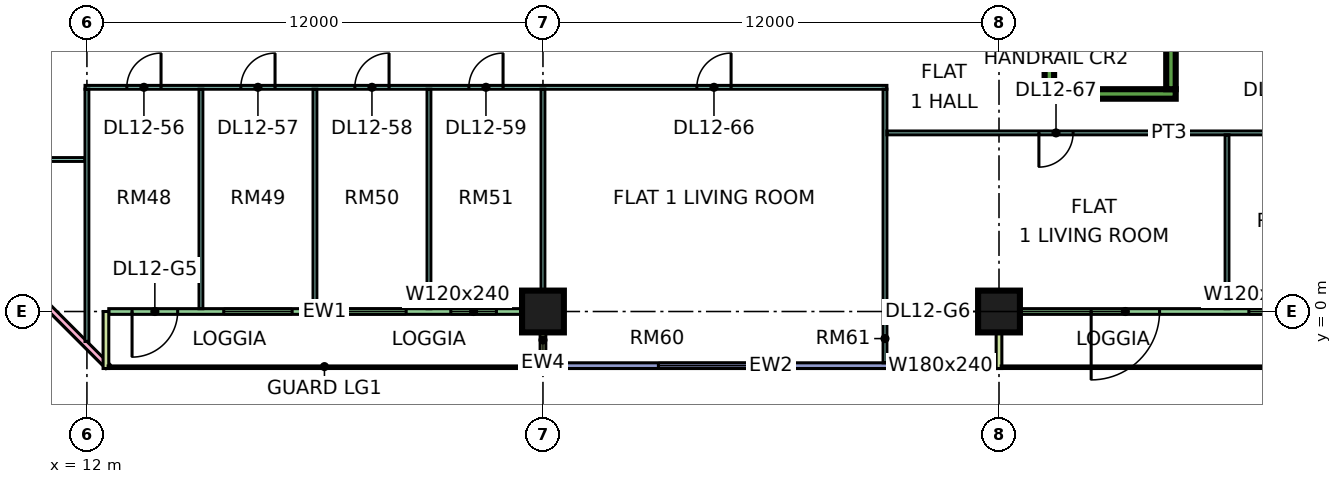
"""IFC4 building model, lengths in metres.
Left out: names, types, materials, properties, quantities, classifications, styles, units other than length and angle.
Written with IfcOpenShell. Run it as: python <this file> out.ifc"""

import sys

from ifc_helpers import new_model, si_unit, direction, frame, frame_2d, origin, origin_2d, place, context, subcontext, project, spatial, rectangle, extrude, element, fill, save


model = new_model("IFC4")
c1 = context("Model", 3, precision=1e-05, world=origin(), true_north=direction((0.0, 1.0)))
c2 = subcontext(c1, "Body", "Model", "MODEL_VIEW")
j1 = project(units=[si_unit("LENGTHUNIT", "METRE"), si_unit("PLANEANGLEUNIT", "RADIAN")], contexts=[c1])
p1 = place(None, origin())
s1 = spatial("IfcSite", under=j1, at=p1, CompositionType="ELEMENT")
p2 = place(p1, origin())
s2 = spatial("IfcBuilding", under=s1, at=p2, CompositionType="ELEMENT")
p3 = place(p2, frame((0.0, 0.0, 60.15)))
s3 = spatial("IfcBuildingStorey", under=s2, at=p3, CompositionType="ELEMENT", Elevation=60.15)
for number, where, z_axis, x_axis in (
    (1, (24.0, 0.0, 0.0), (0.0, 0.0, 1.0), (1.0, 0.0, 0.0)),
    (2, (36.0, 0.0, 0.0), (0.0, 0.0, 1.0), (1.0, 0.0, 0.0)),
):
    element("IfcColumn", number, at=place(p3, frame(where, z_axis=z_axis, x_axis=x_axis)), inside=s3, PredefinedType="COLUMN", context=c2, shape_type="SweptSolid", body=[
        extrude(rectangle(XDim=1.1, YDim=1.1, at=origin_2d()), origin(), (0.0, 0.0, 1.0), 3.75),
    ])
p4 = place(p3, frame((37.2, 5.725, 0.0), z_axis=(0.0, 0.0, 1.0), x_axis=(1.0, 0.0, 0.0)))
e3 = element("IfcWall", 3, at=p4, inside=s3, PredefinedType="SHEAR", context=c2, shape_type="SweptSolid", body=[
    extrude(rectangle(XDim=3.45, YDim=0.25, at=frame_2d((1.725, 0.0))), origin(), (0.0, 0.0, 1.0), 3.75),
])
for number, where, z_axis, x_axis in (
    (4, (37.325, 5.85, 0.0), (0.0, 0.0, 1.0), (0.0, 1.0, 0.0)),
    (5, (40.525, 5.85, 0.0), (0.0, 0.0, 1.0), (0.0, 1.0, 0.0)),
):
    element("IfcWall", number, at=place(p3, frame(where, z_axis=z_axis, x_axis=x_axis)), inside=s3, PredefinedType="SHEAR", context=c2, shape_type="SweptSolid", body=[
        extrude(rectangle(XDim=6.5, YDim=0.25, at=frame_2d((3.25, 0.0))), origin(), (0.0, 0.0, 1.0), 3.75),
    ])
p5 = place(p3, frame((-1.447, 12.553, 0.0), z_axis=(0.0, 0.0, 1.0), x_axis=(0.707106781187, -0.707106781187, 0.0)))
e6 = element("IfcWall", 6, at=p5, inside=s3, PredefinedType="SOLIDWALL", context=c2, shape_type="SweptSolid", body=[
    extrude(rectangle(XDim=19.799, YDim=0.15, at=frame_2d((9.899, 0.0))), origin(), (0.0, 0.0, 1.0), 3.35),
])
p6 = place(p5, frame((2.212, 0.0, 0.45)))
e7 = element("IfcOpeningElement", 7, at=p6, cuts=e6, PredefinedType="OPENING", context=c2, shape_type="SweptSolid", body=[
    extrude(rectangle(XDim=3.0, YDim=2.4, at=frame_2d((1.5, 1.2))), frame((0.0, 0.085, 0.0), z_axis=(0.0, -1.0, 0.0), x_axis=(1.0, 0.0, 0.0)), (0.0, 0.0, 1.0), 0.17),
])
p7 = place(p5, frame((10.216, 0.0, 0.45)))
e8 = element("IfcOpeningElement", 8, at=p7, cuts=e6, PredefinedType="OPENING", context=c2, shape_type="SweptSolid", body=[
    extrude(rectangle(XDim=3.0, YDim=2.4, at=frame_2d((1.5, 1.2))), frame((0.0, 0.085, 0.0), z_axis=(0.0, -1.0, 0.0), x_axis=(1.0, 0.0, 0.0)), (0.0, 0.0, 1.0), 0.17),
])
p8 = place(p3, frame((12.575, 0.0, 0.0), z_axis=(0.0, 0.0, 1.0), x_axis=(1.0, 0.0, 0.0)))
e9 = element("IfcWall", 9, at=p8, inside=s3, PredefinedType="SOLIDWALL", context=c2, shape_type="SweptSolid", body=[
    extrude(rectangle(XDim=11.35, YDim=0.15, at=frame_2d((5.675, 0.0))), origin(), (0.0, 0.0, 1.0), 3.35),
])
p9 = place(p8, frame((0.613, 0.0, 0.0)))
e10 = element("IfcOpeningElement", 10, at=p9, cuts=e9, PredefinedType="OPENING", context=c2, shape_type="SweptSolid", body=[
    extrude(rectangle(XDim=1.2, YDim=2.4, at=frame_2d((0.6, 1.2))), frame((0.0, 0.085, 0.0), z_axis=(0.0, -1.0, 0.0), x_axis=(1.0, 0.0, 0.0)), (0.0, 0.0, 1.0), 0.17),
])
p10 = place(p8, frame((3.025, 0.0, 0.45)))
e11 = element("IfcOpeningElement", 11, at=p10, cuts=e9, PredefinedType="OPENING", context=c2, shape_type="SweptSolid", body=[
    extrude(rectangle(XDim=1.8, YDim=2.4, at=frame_2d((0.9, 1.2))), frame((0.0, 0.085, 0.0), z_axis=(0.0, -1.0, 0.0), x_axis=(1.0, 0.0, 0.0)), (0.0, 0.0, 1.0), 0.17),
])
p11 = place(p8, frame((6.025, 0.0, 0.45)))
e12 = element("IfcOpeningElement", 12, at=p11, cuts=e9, PredefinedType="OPENING", context=c2, shape_type="SweptSolid", body=[
    extrude(rectangle(XDim=1.8, YDim=2.4, at=frame_2d((0.9, 1.2))), frame((0.0, 0.085, 0.0), z_axis=(0.0, -1.0, 0.0), x_axis=(1.0, 0.0, 0.0)), (0.0, 0.0, 1.0), 0.17),
])
p12 = place(p8, frame((9.0, 0.0, 0.45)))
e13 = element("IfcOpeningElement", 13, at=p12, cuts=e9, PredefinedType="OPENING", context=c2, shape_type="SweptSolid", body=[
    extrude(rectangle(XDim=1.2, YDim=2.4, at=frame_2d((0.6, 1.2))), frame((0.0, 0.085, 0.0), z_axis=(0.0, -1.0, 0.0), x_axis=(1.0, 0.0, 0.0)), (0.0, 0.0, 1.0), 0.17),
])
for number, where, z_axis, x_axis in (
    (14, (12.5, -1.5, 0.0), (0.0, 0.0, 1.0), (0.0, 1.0, 0.0)),
    (15, (24.0, -1.5, 0.0), (0.0, 0.0, 1.0), (0.0, 1.0, 0.0)),
):
    element("IfcWall", number, at=place(p3, frame(where, z_axis=z_axis, x_axis=x_axis)), inside=s3, PredefinedType="SOLIDWALL", context=c2, shape_type="SweptSolid", body=[
        extrude(rectangle(XDim=1.5, YDim=0.15, at=frame_2d((0.75, 0.0))), origin(), (0.0, 0.0, 1.0), 3.35),
    ])
p13 = place(p3, frame((24.075, -1.425, 0.0), z_axis=(0.0, 0.0, 1.0), x_axis=(1.0, 0.0, 0.0)))
e16 = element("IfcWall", 16, at=p13, inside=s3, PredefinedType="SOLIDWALL", context=c2, shape_type="SweptSolid", body=[
    extrude(rectangle(XDim=11.85, YDim=0.15, at=frame_2d((5.925, 0.0))), origin(), (0.0, 0.0, 1.0), 3.35),
])
p14 = place(p13, frame((2.962, 0.0, 0.45)))
e17 = element("IfcOpeningElement", 17, at=p14, cuts=e16, PredefinedType="OPENING", context=c2, shape_type="SweptSolid", body=[
    extrude(rectangle(XDim=3.0, YDim=2.4, at=frame_2d((1.5, 1.2))), frame((0.0, 0.085, 0.0), z_axis=(0.0, -1.0, 0.0), x_axis=(1.0, 0.0, 0.0)), (0.0, 0.0, 1.0), 0.17),
])
p15 = place(p13, frame((9.488, 0.0, 0.45)))
e18 = element("IfcOpeningElement", 18, at=p15, cuts=e16, PredefinedType="OPENING", context=c2, shape_type="SweptSolid", body=[
    extrude(rectangle(XDim=1.8, YDim=2.4, at=frame_2d((0.9, 1.2))), frame((0.0, 0.085, 0.0), z_axis=(0.0, -1.0, 0.0), x_axis=(1.0, 0.0, 0.0)), (0.0, 0.0, 1.0), 0.17),
])
p16 = place(p3, frame((36.075, 0.0, 0.0), z_axis=(0.0, 0.0, 1.0), x_axis=(1.0, 0.0, 0.0)))
e19 = element("IfcWall", 19, at=p16, inside=s3, PredefinedType="SOLIDWALL", context=c2, shape_type="SweptSolid", body=[
    extrude(rectangle(XDim=11.85, YDim=0.15, at=frame_2d((5.925, 0.0))), origin(), (0.0, 0.0, 1.0), 3.35),
])
p17 = place(p16, frame((2.35, 0.0, 0.0)))
e20 = element("IfcOpeningElement", 20, at=p17, cuts=e19, PredefinedType="OPENING", context=c2, shape_type="SweptSolid", body=[
    extrude(rectangle(XDim=1.8, YDim=2.4, at=frame_2d((0.9, 1.2))), frame((0.0, 0.085, 0.0), z_axis=(0.0, -1.0, 0.0), x_axis=(1.0, 0.0, 0.0)), (0.0, 0.0, 1.0), 0.17),
])
p18 = place(p16, frame((6.5, 0.0, 0.45)))
e21 = element("IfcOpeningElement", 21, at=p18, cuts=e19, PredefinedType="OPENING", context=c2, shape_type="SweptSolid", body=[
    extrude(rectangle(XDim=1.2, YDim=2.4, at=frame_2d((0.6, 1.2))), frame((0.0, 0.085, 0.0), z_axis=(0.0, -1.0, 0.0), x_axis=(1.0, 0.0, 0.0)), (0.0, 0.0, 1.0), 0.17),
])
p19 = place(p16, frame((10.113, 0.0, 0.45)))
e22 = element("IfcOpeningElement", 22, at=p19, cuts=e19, PredefinedType="OPENING", context=c2, shape_type="SweptSolid", body=[
    extrude(rectangle(XDim=1.2, YDim=2.4, at=frame_2d((0.6, 1.2))), frame((0.0, 0.085, 0.0), z_axis=(0.0, -1.0, 0.0), x_axis=(1.0, 0.0, 0.0)), (0.0, 0.0, 1.0), 0.17),
])
p20 = place(p3, frame((36.0, -1.5, 0.0), z_axis=(0.0, 0.0, 1.0), x_axis=(0.0, 1.0, 0.0)))
e23 = element("IfcWall", 23, at=p20, inside=s3, PredefinedType="SOLIDWALL", context=c2, shape_type="SweptSolid", body=[
    extrude(rectangle(XDim=1.5, YDim=0.15, at=frame_2d((0.75, 0.0))), origin(), (0.0, 0.0, 1.0), 3.35),
])
p21 = place(p3, frame((9.05, 4.0, 0.0), z_axis=(0.0, 0.0, 1.0), x_axis=(1.0, 0.0, 0.0)))
e24 = element("IfcWall", 24, at=p21, inside=s3, PredefinedType="PARTITIONING", context=c2, shape_type="SweptSolid", body=[
    extrude(rectangle(XDim=2.9, YDim=0.1, at=frame_2d((1.45, 0.0))), origin(), (0.0, 0.0, 1.0), 3.35),
])
p22 = place(p3, frame((11.95, 5.9, 0.0), z_axis=(0.0, 0.0, 1.0), x_axis=(1.0, 0.0, 0.0)))
e25 = element("IfcWall", 25, at=p22, inside=s3, PredefinedType="PARTITIONING", context=c2, shape_type="SweptSolid", body=[
    extrude(rectangle(XDim=21.1, YDim=0.1, at=frame_2d((10.55, 0.0))), origin(), (0.0, 0.0, 1.0), 3.35),
])
p23 = place(p22, frame((1.1, 0.0, 0.0)))
e26 = element("IfcOpeningElement", 26, at=p23, cuts=e25, PredefinedType="OPENING", context=c2, shape_type="SweptSolid", body=[
    extrude(rectangle(XDim=0.9, YDim=2.1, at=frame_2d((0.45, 1.05))), frame((0.0, 0.06, 0.0), z_axis=(0.0, -1.0, 0.0), x_axis=(1.0, 0.0, 0.0)), (0.0, 0.0, 1.0), 0.12),
])
p24 = place(p22, frame((4.1, 0.0, 0.0)))
e27 = element("IfcOpeningElement", 27, at=p24, cuts=e25, PredefinedType="OPENING", context=c2, shape_type="SweptSolid", body=[
    extrude(rectangle(XDim=0.9, YDim=2.1, at=frame_2d((0.45, 1.05))), frame((0.0, 0.06, 0.0), z_axis=(0.0, -1.0, 0.0), x_axis=(1.0, 0.0, 0.0)), (0.0, 0.0, 1.0), 0.12),
])
p25 = place(p22, frame((7.1, 0.0, 0.0)))
e28 = element("IfcOpeningElement", 28, at=p25, cuts=e25, PredefinedType="OPENING", context=c2, shape_type="SweptSolid", body=[
    extrude(rectangle(XDim=0.9, YDim=2.1, at=frame_2d((0.45, 1.05))), frame((0.0, 0.06, 0.0), z_axis=(0.0, -1.0, 0.0), x_axis=(1.0, 0.0, 0.0)), (0.0, 0.0, 1.0), 0.12),
])
p26 = place(p22, frame((10.1, 0.0, 0.0)))
e29 = element("IfcOpeningElement", 29, at=p26, cuts=e25, PredefinedType="OPENING", context=c2, shape_type="SweptSolid", body=[
    extrude(rectangle(XDim=0.9, YDim=2.1, at=frame_2d((0.45, 1.05))), frame((0.0, 0.06, 0.0), z_axis=(0.0, -1.0, 0.0), x_axis=(1.0, 0.0, 0.0)), (0.0, 0.0, 1.0), 0.12),
])
p27 = place(p22, frame((16.1, 0.0, 0.0)))
e30 = element("IfcOpeningElement", 30, at=p27, cuts=e25, PredefinedType="OPENING", context=c2, shape_type="SweptSolid", body=[
    extrude(rectangle(XDim=0.9, YDim=2.1, at=frame_2d((0.45, 1.05))), frame((0.0, 0.06, 0.0), z_axis=(0.0, -1.0, 0.0), x_axis=(1.0, 0.0, 0.0)), (0.0, 0.0, 1.0), 0.12),
])
p28 = place(p3, frame((12.0, -0.788, 0.0), z_axis=(0.0, 0.0, 1.0), x_axis=(0.0, 1.0, 0.0)))
e31 = element("IfcWall", 31, at=p28, inside=s3, PredefinedType="PARTITIONING", context=c2, shape_type="SweptSolid", body=[
    extrude(rectangle(XDim=6.638, YDim=0.1, at=frame_2d((3.319, 0.0))), origin(), (0.0, 0.0, 1.0), 3.35),
])
for number, where, z_axis, x_axis in (
    (32, (15.0, 0.074, 0.0), (0.0, 0.0, 1.0), (0.0, 1.0, 0.0)),
    (33, (18.0, 0.074, 0.0), (0.0, 0.0, 1.0), (0.0, 1.0, 0.0)),
    (34, (21.0, 0.074, 0.0), (0.0, 0.0, 1.0), (0.0, 1.0, 0.0)),
):
    element("IfcWall", number, at=place(p3, frame(where, z_axis=z_axis, x_axis=x_axis)), inside=s3, PredefinedType="PARTITIONING", context=c2, shape_type="SweptSolid", body=[
        extrude(rectangle(XDim=5.776, YDim=0.1, at=frame_2d((2.888, 0.0))), origin(), (0.0, 0.0, 1.0), 3.35),
    ])
p29 = place(p3, frame((24.0, 0.0, 0.0), z_axis=(0.0, 0.0, 1.0), x_axis=(0.0, 1.0, 0.0)))
e35 = element("IfcWall", 35, at=p29, inside=s3, PredefinedType="PARTITIONING", context=c2, shape_type="SweptSolid", body=[
    extrude(rectangle(XDim=5.85, YDim=0.1, at=frame_2d((2.925, 0.0))), origin(), (0.0, 0.0, 1.0), 3.35),
])
p30 = place(p3, frame((33.0, -1.35, 0.0), z_axis=(0.0, 0.0, 1.0), x_axis=(0.0, 1.0, 0.0)))
e36 = element("IfcWall", 36, at=p30, inside=s3, PredefinedType="PARTITIONING", context=c2, shape_type="SweptSolid", body=[
    extrude(rectangle(XDim=7.2, YDim=0.1, at=frame_2d((3.6, 0.0))), origin(), (0.0, 0.0, 1.0), 3.35),
])
p31 = place(p3, frame((33.05, 4.7, 0.0), z_axis=(0.0, 0.0, 1.0), x_axis=(1.0, 0.0, 0.0)))
e37 = element("IfcWall", 37, at=p31, inside=s3, PredefinedType="PARTITIONING", context=c2, shape_type="SweptSolid", body=[
    extrude(rectangle(XDim=14.85, YDim=0.1, at=frame_2d((7.425, 0.0))), origin(), (0.0, 0.0, 1.0), 3.35),
])
p32 = place(p31, frame((10.0, 0.0, 0.0)))
e38 = element("IfcOpeningElement", 38, at=p32, cuts=e37, PredefinedType="OPENING", context=c2, shape_type="SweptSolid", body=[
    extrude(rectangle(XDim=0.9, YDim=2.1, at=frame_2d((0.45, 1.05))), frame((0.0, 0.06, 0.0), z_axis=(0.0, -1.0, 0.0), x_axis=(1.0, 0.0, 0.0)), (0.0, 0.0, 1.0), 0.12),
])
p33 = place(p31, frame((13.0, 0.0, 0.0)))
e39 = element("IfcOpeningElement", 39, at=p33, cuts=e37, PredefinedType="OPENING", context=c2, shape_type="SweptSolid", body=[
    extrude(rectangle(XDim=0.9, YDim=2.1, at=frame_2d((0.45, 1.05))), frame((0.0, 0.06, 0.0), z_axis=(0.0, -1.0, 0.0), x_axis=(1.0, 0.0, 0.0)), (0.0, 0.0, 1.0), 0.12),
])
p34 = place(p31, frame((4.0, 0.0, 0.0)))
e40 = element("IfcOpeningElement", 40, at=p34, cuts=e37, PredefinedType="OPENING", context=c2, shape_type="SweptSolid", body=[
    extrude(rectangle(XDim=0.9, YDim=2.1, at=frame_2d((0.45, 1.05))), frame((0.0, 0.06, 0.0), z_axis=(0.0, -1.0, 0.0), x_axis=(1.0, 0.0, 0.0)), (0.0, 0.0, 1.0), 0.12),
])
p35 = place(p3, frame((42.0, 0.074, 0.0), z_axis=(0.0, 0.0, 1.0), x_axis=(0.0, 1.0, 0.0)))
e41 = element("IfcWall", 41, at=p35, inside=s3, PredefinedType="PARTITIONING", context=c2, shape_type="SweptSolid", body=[
    extrude(rectangle(XDim=4.576, YDim=0.1, at=frame_2d((2.288, 0.0))), origin(), (0.0, 0.0, 1.0), 3.35),
])
p36 = place(p9, frame((1.2, 0.0, 0.0), z_axis=(0.0, 0.0, 1.0), x_axis=(-1.0, 0.0, 0.0)))
e42 = element("IfcDoor", 42, at=p36, inside=s3, OperationType="DOUBLE_DOOR_SINGLE_SWING", PredefinedType="DOOR", context=c2, shape_type="SweptSolid", body=[
    extrude(rectangle(XDim=1.2, YDim=2.4, at=frame_2d((0.6, 1.2))), frame((0.0, 0.025, 0.0), z_axis=(0.0, -1.0, 0.0), x_axis=(1.0, 0.0, 0.0)), (0.0, 0.0, 1.0), 0.05),
])
fill(e10, e42)
p37 = place(p10, origin())
e43 = element("IfcWindow", 43, at=p37, inside=s3, PartitioningType="SINGLE_PANEL", PredefinedType="WINDOW", context=c2, shape_type="SweptSolid", body=[
    extrude(rectangle(XDim=1.8, YDim=2.4, at=frame_2d((0.9, 1.2))), frame((0.0, 0.03, 0.0), z_axis=(0.0, -1.0, 0.0), x_axis=(1.0, 0.0, 0.0)), (0.0, 0.0, 1.0), 0.06),
])
fill(e11, e43)
p38 = place(p11, origin())
e44 = element("IfcWindow", 44, at=p38, inside=s3, PartitioningType="SINGLE_PANEL", PredefinedType="WINDOW", context=c2, shape_type="SweptSolid", body=[
    extrude(rectangle(XDim=1.8, YDim=2.4, at=frame_2d((0.9, 1.2))), frame((0.0, 0.03, 0.0), z_axis=(0.0, -1.0, 0.0), x_axis=(1.0, 0.0, 0.0)), (0.0, 0.0, 1.0), 0.06),
])
fill(e12, e44)
p39 = place(p12, origin())
e45 = element("IfcWindow", 45, at=p39, inside=s3, PartitioningType="SINGLE_PANEL", PredefinedType="WINDOW", context=c2, shape_type="SweptSolid", body=[
    extrude(rectangle(XDim=1.2, YDim=2.4, at=frame_2d((0.6, 1.2))), frame((0.0, 0.03, 0.0), z_axis=(0.0, -1.0, 0.0), x_axis=(1.0, 0.0, 0.0)), (0.0, 0.0, 1.0), 0.06),
])
fill(e13, e45)
p40 = place(p14, origin())
e46 = element("IfcWindow", 46, at=p40, inside=s3, PartitioningType="SINGLE_PANEL", PredefinedType="WINDOW", context=c2, shape_type="SweptSolid", body=[
    extrude(rectangle(XDim=3.0, YDim=2.4, at=frame_2d((1.5, 1.2))), frame((0.0, 0.03, 0.0), z_axis=(0.0, -1.0, 0.0), x_axis=(1.0, 0.0, 0.0)), (0.0, 0.0, 1.0), 0.06),
])
fill(e17, e46)
p41 = place(p15, origin())
e47 = element("IfcWindow", 47, at=p41, inside=s3, PartitioningType="SINGLE_PANEL", PredefinedType="WINDOW", context=c2, shape_type="SweptSolid", body=[
    extrude(rectangle(XDim=1.8, YDim=2.4, at=frame_2d((0.9, 1.2))), frame((0.0, 0.03, 0.0), z_axis=(0.0, -1.0, 0.0), x_axis=(1.0, 0.0, 0.0)), (0.0, 0.0, 1.0), 0.06),
])
fill(e18, e47)
p42 = place(p17, frame((1.8, 0.0, 0.0), z_axis=(0.0, 0.0, 1.0), x_axis=(-1.0, 0.0, 0.0)))
e48 = element("IfcDoor", 48, at=p42, inside=s3, OperationType="DOUBLE_DOOR_SINGLE_SWING", PredefinedType="DOOR", context=c2, shape_type="SweptSolid", body=[
    extrude(rectangle(XDim=1.8, YDim=2.4, at=frame_2d((0.9, 1.2))), frame((0.0, 0.025, 0.0), z_axis=(0.0, -1.0, 0.0), x_axis=(1.0, 0.0, 0.0)), (0.0, 0.0, 1.0), 0.05),
])
fill(e20, e48)
p43 = place(p18, origin())
e49 = element("IfcWindow", 49, at=p43, inside=s3, PartitioningType="SINGLE_PANEL", PredefinedType="WINDOW", context=c2, shape_type="SweptSolid", body=[
    extrude(rectangle(XDim=1.2, YDim=2.4, at=frame_2d((0.6, 1.2))), frame((0.0, 0.03, 0.0), z_axis=(0.0, -1.0, 0.0), x_axis=(1.0, 0.0, 0.0)), (0.0, 0.0, 1.0), 0.06),
])
fill(e21, e49)
p44 = place(p23, frame((0.9, 0.0, 0.0), z_axis=(0.0, 0.0, 1.0), x_axis=(-1.0, 0.0, 0.0)))
e50 = element("IfcDoor", 50, at=p44, inside=s3, OperationType="SINGLE_SWING_RIGHT", PredefinedType="DOOR", context=c2, shape_type="SweptSolid", body=[
    extrude(rectangle(XDim=0.9, YDim=2.1, at=frame_2d((0.45, 1.05))), frame((0.0, 0.025, 0.0), z_axis=(0.0, -1.0, 0.0), x_axis=(1.0, 0.0, 0.0)), (0.0, 0.0, 1.0), 0.05),
])
fill(e26, e50)
p45 = place(p24, frame((0.9, 0.0, 0.0), z_axis=(0.0, 0.0, 1.0), x_axis=(-1.0, 0.0, 0.0)))
e51 = element("IfcDoor", 51, at=p45, inside=s3, OperationType="SINGLE_SWING_RIGHT", PredefinedType="DOOR", context=c2, shape_type="SweptSolid", body=[
    extrude(rectangle(XDim=0.9, YDim=2.1, at=frame_2d((0.45, 1.05))), frame((0.0, 0.025, 0.0), z_axis=(0.0, -1.0, 0.0), x_axis=(1.0, 0.0, 0.0)), (0.0, 0.0, 1.0), 0.05),
])
fill(e27, e51)
p46 = place(p25, frame((0.9, 0.0, 0.0), z_axis=(0.0, 0.0, 1.0), x_axis=(-1.0, 0.0, 0.0)))
e52 = element("IfcDoor", 52, at=p46, inside=s3, OperationType="SINGLE_SWING_RIGHT", PredefinedType="DOOR", context=c2, shape_type="SweptSolid", body=[
    extrude(rectangle(XDim=0.9, YDim=2.1, at=frame_2d((0.45, 1.05))), frame((0.0, 0.025, 0.0), z_axis=(0.0, -1.0, 0.0), x_axis=(1.0, 0.0, 0.0)), (0.0, 0.0, 1.0), 0.05),
])
fill(e28, e52)
p47 = place(p26, frame((0.9, 0.0, 0.0), z_axis=(0.0, 0.0, 1.0), x_axis=(-1.0, 0.0, 0.0)))
e53 = element("IfcDoor", 53, at=p47, inside=s3, OperationType="SINGLE_SWING_RIGHT", PredefinedType="DOOR", context=c2, shape_type="SweptSolid", body=[
    extrude(rectangle(XDim=0.9, YDim=2.1, at=frame_2d((0.45, 1.05))), frame((0.0, 0.025, 0.0), z_axis=(0.0, -1.0, 0.0), x_axis=(1.0, 0.0, 0.0)), (0.0, 0.0, 1.0), 0.05),
])
fill(e29, e53)
p48 = place(p27, frame((0.9, 0.0, 0.0), z_axis=(0.0, 0.0, 1.0), x_axis=(-1.0, 0.0, 0.0)))
e54 = element("IfcDoor", 54, at=p48, inside=s3, OperationType="SINGLE_SWING_RIGHT", PredefinedType="DOOR", context=c2, shape_type="SweptSolid", body=[
    extrude(rectangle(XDim=0.9, YDim=2.1, at=frame_2d((0.45, 1.05))), frame((0.0, 0.025, 0.0), z_axis=(0.0, -1.0, 0.0), x_axis=(1.0, 0.0, 0.0)), (0.0, 0.0, 1.0), 0.05),
])
fill(e30, e54)
p49 = place(p34, frame((0.9, 0.0, 0.0), z_axis=(0.0, 0.0, 1.0), x_axis=(-1.0, 0.0, 0.0)))
e55 = element("IfcDoor", 55, at=p49, inside=s3, OperationType="SINGLE_SWING_LEFT", PredefinedType="DOOR", context=c2, shape_type="SweptSolid", body=[
    extrude(rectangle(XDim=0.9, YDim=2.1, at=frame_2d((0.45, 1.05))), frame((0.0, 0.025, 0.0), z_axis=(0.0, -1.0, 0.0), x_axis=(1.0, 0.0, 0.0)), (0.0, 0.0, 1.0), 0.05),
])
fill(e40, e55)
save(model, sys.argv[1])
